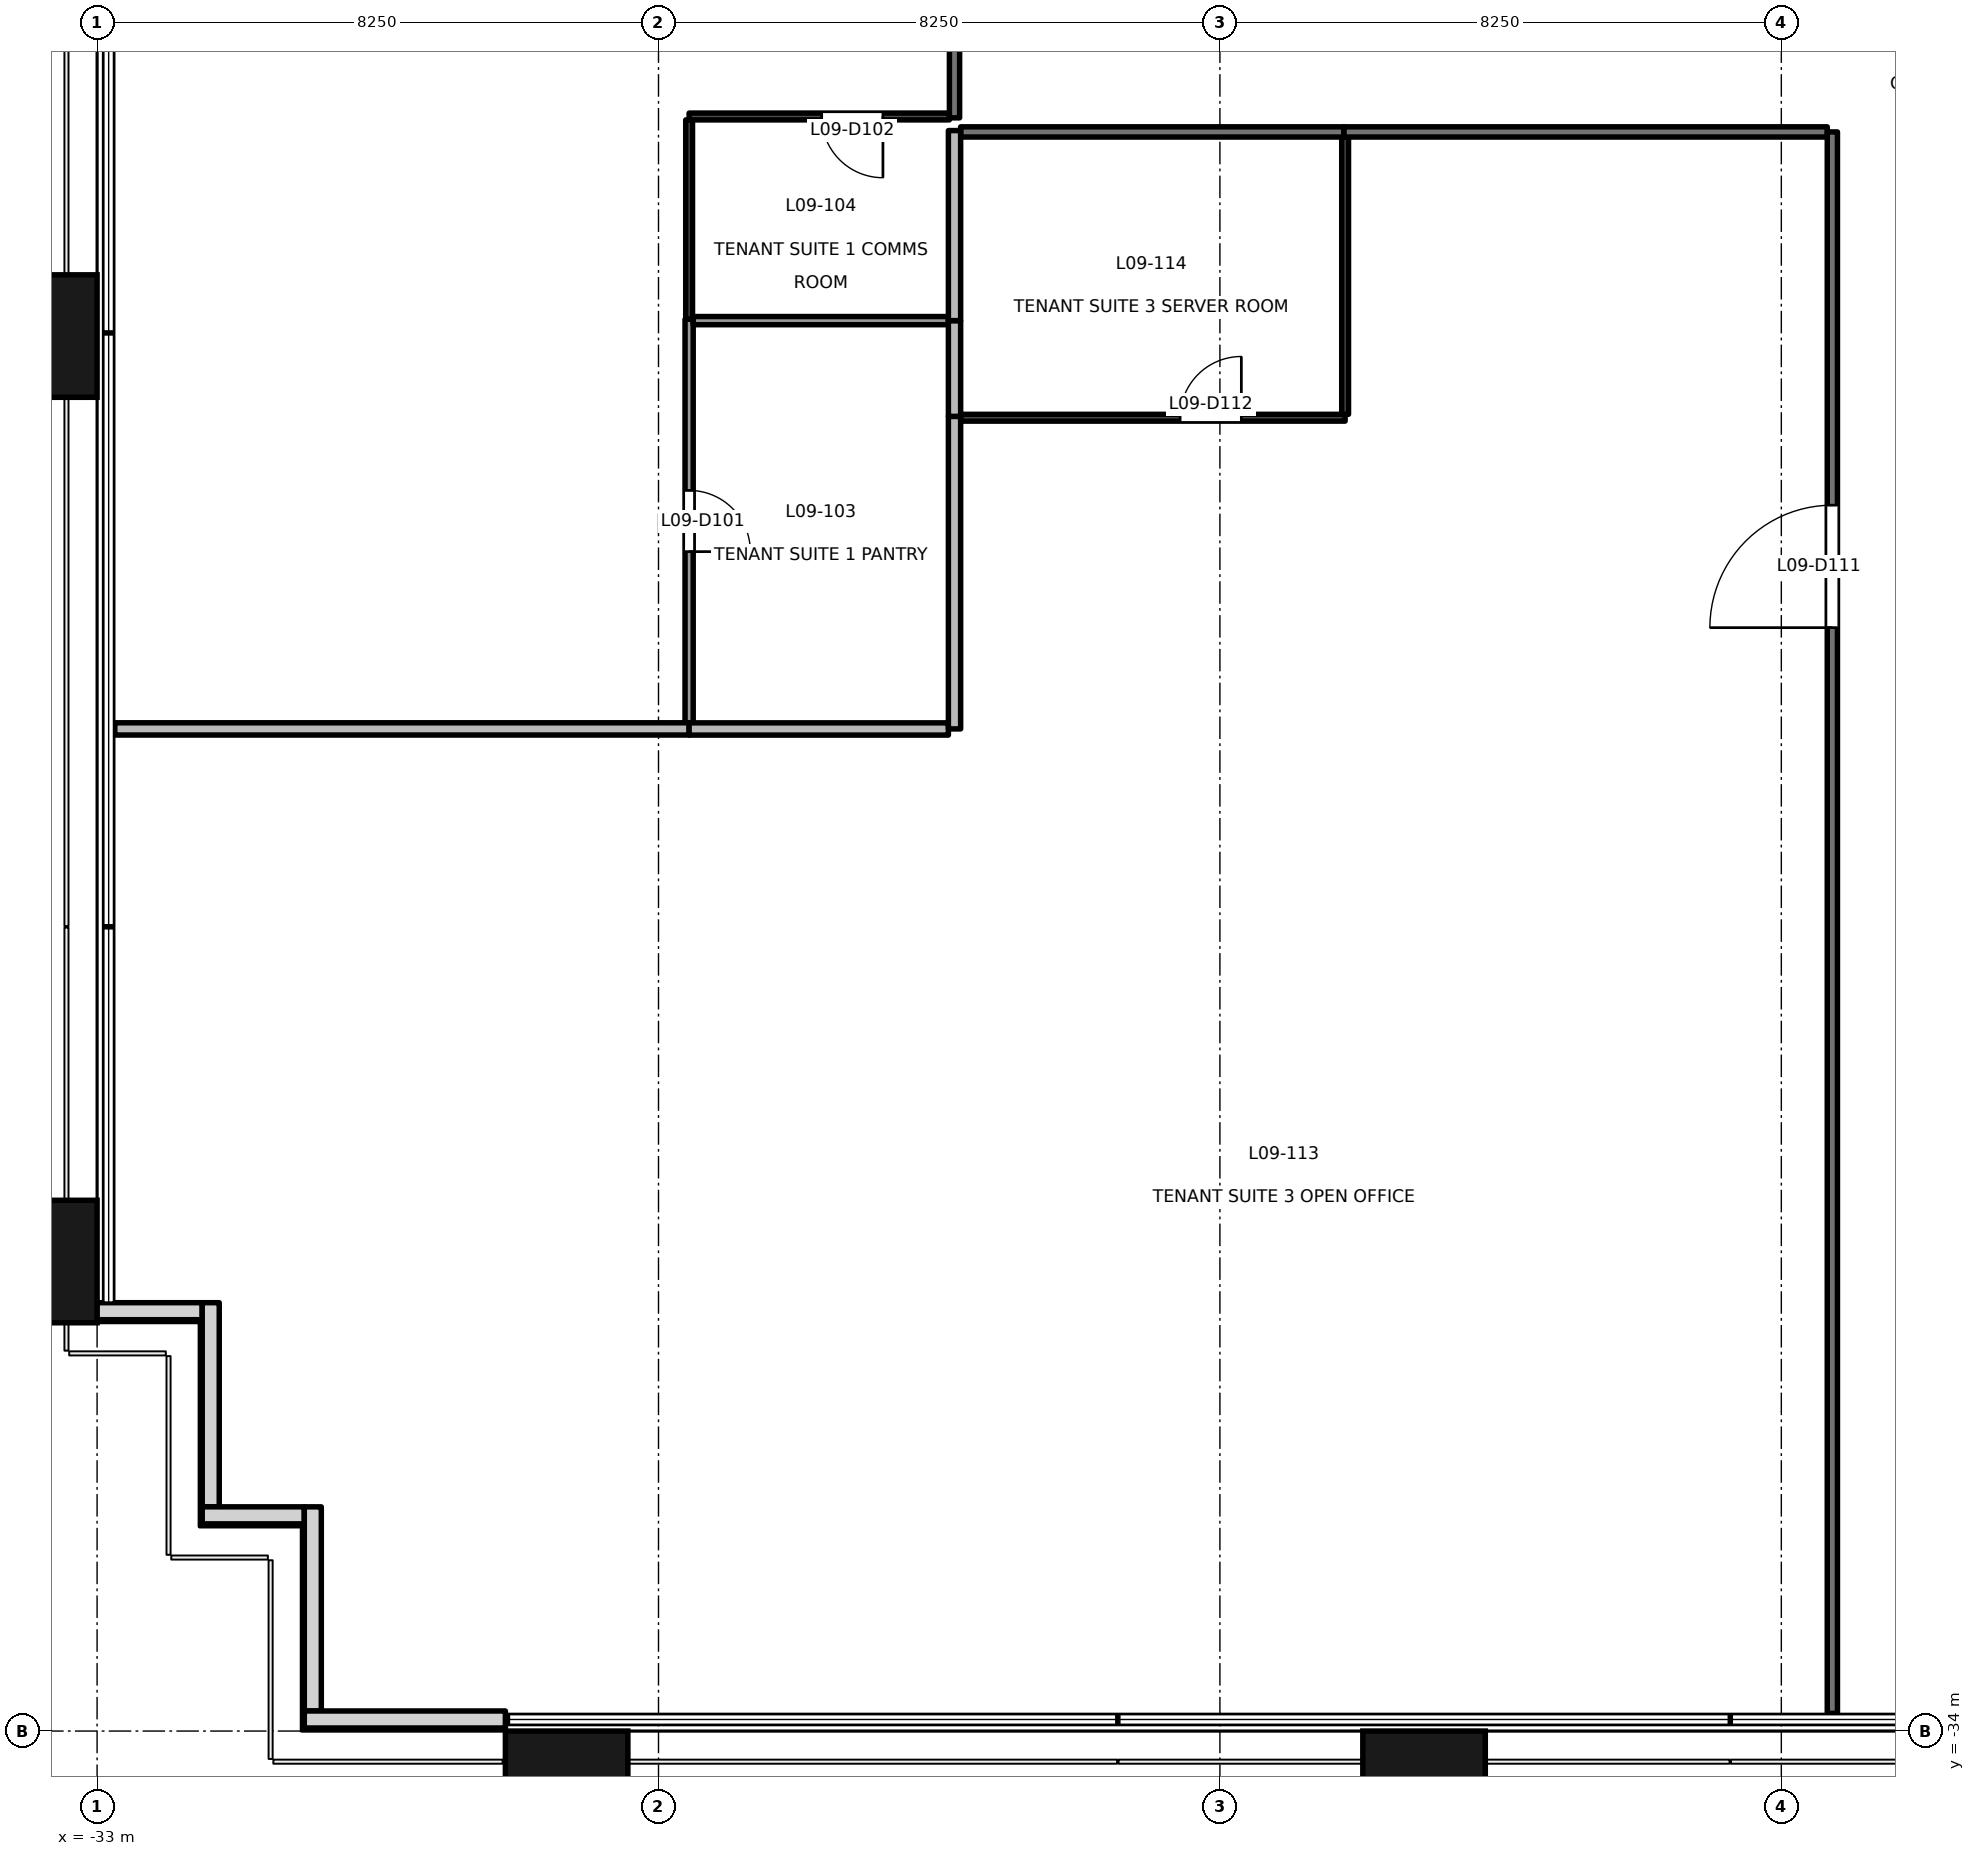
"""IFC4 building model, lengths in metres.
Left out: names, types, materials, properties, quantities, classifications, styles, units other than length and angle.
Written with IfcOpenShell. Run it as: python <this file> out.ifc"""

import sys

from ifc_helpers import new_model, si_unit, direction, frame, frame_2d, origin, origin_2d, place, context, subcontext, project, spatial, rectangle, extrude, element, fill, save


model = new_model("IFC4")
c1 = context("Model", 3, precision=1e-05, world=origin(), true_north=direction((0.0, 1.0)))
c2 = subcontext(c1, "Body", "Model", "MODEL_VIEW")
j1 = project(units=[si_unit("LENGTHUNIT", "METRE"), si_unit("PLANEANGLEUNIT", "RADIAN")], contexts=[c1])
p1 = place(None, origin())
s1 = spatial("IfcSite", under=j1, at=p1, CompositionType="ELEMENT")
p2 = place(p1, origin())
s2 = spatial("IfcBuilding", under=s1, at=p2, CompositionType="ELEMENT")
p3 = place(p2, frame((0.0, 0.0, 44.7)))
s3 = spatial("IfcBuildingStorey", under=s2, at=p3, CompositionType="ELEMENT", Elevation=44.7)
for number, where, z_axis, x_axis in (
    (1, (-26.1, -34.9, -0.2), (0.0, 0.0, 1.0), (1.0, 0.0, 0.0)),
    (2, (-13.5, -34.9, -0.2), (0.0, 0.0, 1.0), (1.0, 0.0, 0.0)),
    (3, (-33.9, -27.1, -0.2), (0.0, 0.0, 1.0), (0.0, 1.0, 0.0)),
    (4, (-33.9, -13.5, -0.2), (0.0, 0.0, 1.0), (0.0, 1.0, 0.0)),
):
    element("IfcColumn", number, at=place(p3, frame(where, z_axis=z_axis, x_axis=x_axis)), inside=s3, PredefinedType="COLUMN", context=c2, shape_type="SweptSolid", body=[
        extrude(rectangle(XDim=1.8, YDim=1.8, at=origin_2d()), origin(), (0.0, 0.0, 1.0), 4.1),
    ])
p4 = place(p3, frame((-33.005, -27.83, 0.0), z_axis=(0.0, 0.0, 1.0), x_axis=(1.0, 0.0, 0.0)))
e5 = element("IfcWall", 5, at=p4, inside=s3, PredefinedType="SOLIDWALL", context=c2, shape_type="SweptSolid", body=[
    extrude(rectangle(XDim=1.55, YDim=0.25, at=frame_2d((0.775, 0.0))), origin(), (0.0, 0.0, 1.0), 3.9),
])
p5 = place(p3, frame((-31.33, -27.705, 0.0), z_axis=(0.0, 0.0, 1.0), x_axis=(0.0, -1.0, 0.0)))
e6 = element("IfcWall", 6, at=p5, inside=s3, PredefinedType="SOLIDWALL", context=c2, shape_type="SweptSolid", body=[
    extrude(rectangle(XDim=3.0, YDim=0.25, at=frame_2d((1.5, 0.0))), origin(), (0.0, 0.0, 1.0), 3.9),
])
p6 = place(p3, frame((-31.455, -30.83, 0.0), z_axis=(0.0, 0.0, 1.0), x_axis=(1.0, 0.0, 0.0)))
e7 = element("IfcWall", 7, at=p6, inside=s3, PredefinedType="SOLIDWALL", context=c2, shape_type="SweptSolid", body=[
    extrude(rectangle(XDim=1.5, YDim=0.25, at=frame_2d((0.75, 0.0))), origin(), (0.0, 0.0, 1.0), 3.9),
])
p7 = place(p3, frame((-29.83, -30.705, 0.0), z_axis=(0.0, 0.0, 1.0), x_axis=(0.0, -1.0, 0.0)))
e8 = element("IfcWall", 8, at=p7, inside=s3, PredefinedType="SOLIDWALL", context=c2, shape_type="SweptSolid", body=[
    extrude(rectangle(XDim=3.0, YDim=0.25, at=frame_2d((1.5, 0.0))), origin(), (0.0, 0.0, 1.0), 3.9),
])
p8 = place(p3, frame((-29.955, -33.83, 0.0), z_axis=(0.0, 0.0, 1.0), x_axis=(1.0, 0.0, 0.0)))
e9 = element("IfcWall", 9, at=p8, inside=s3, PredefinedType="SOLIDWALL", context=c2, shape_type="SweptSolid", body=[
    extrude(rectangle(XDim=2.955, YDim=0.25, at=frame_2d((1.478, 0.0))), origin(), (0.0, 0.0, 1.0), 3.9),
])
p9 = place(p3, frame((-20.4, -10.293, 0.0), z_axis=(0.0, 0.0, 1.0), x_axis=(0.0, 1.0, 0.0)))
e10 = element("IfcWall", 10, at=p9, inside=s3, PredefinedType="PARTITIONING", context=c2, shape_type="SweptSolid", body=[
    extrude(rectangle(XDim=6.04, YDim=0.15, at=frame_2d((3.02, 0.0))), origin(), (0.0, 0.0, 1.0), 3.3),
])
p10 = place(p9, frame((2.12, 0.0, 0.0)))
e11 = element("IfcOpeningElement", 11, at=p10, cuts=e10, PredefinedType="OPENING", context=c2, shape_type="SweptSolid", body=[
    extrude(rectangle(XDim=1.8, YDim=2.1, at=frame_2d((0.9, 1.05))), frame((0.0, 0.085, 0.0), z_axis=(0.0, -1.0, 0.0), x_axis=(1.0, 0.0, 0.0)), (0.0, 0.0, 1.0), 0.171),
])
p11 = place(p3, frame((-7.575, -10.5, 0.0), z_axis=(0.0, 0.0, 1.0), x_axis=(-1.0, 0.0, 0.0)))
e12 = element("IfcWall", 12, at=p11, inside=s3, PredefinedType="PARTITIONING", context=c2, shape_type="SweptSolid", body=[
    extrude(rectangle(XDim=7.105, YDim=0.15, at=frame_2d((3.552, 0.0))), origin(), (0.0, 0.0, 1.0), 2.9),
])
p12 = place(p3, frame((-7.5, -33.74, 0.0), z_axis=(0.0, 0.0, 1.0), x_axis=(0.0, 1.0, 0.0)))
e13 = element("IfcWall", 13, at=p12, inside=s3, PredefinedType="PARTITIONING", context=c2, shape_type="SweptSolid", body=[
    extrude(rectangle(XDim=23.24, YDim=0.15, at=frame_2d((11.62, 0.0))), origin(), (0.0, 0.0, 1.0), 3.9),
])
p13 = place(p12, frame((15.955, 0.0, 0.0)))
e14 = element("IfcOpeningElement", 14, at=p13, cuts=e13, PredefinedType="OPENING", context=c2, shape_type="SweptSolid", body=[
    extrude(rectangle(XDim=1.8, YDim=2.1, at=frame_2d((0.9, 1.05))), frame((0.0, 0.085, 0.0), z_axis=(0.0, -1.0, 0.0), x_axis=(1.0, 0.0, 0.0)), (0.0, 0.0, 1.0), 0.171),
])
p14 = place(p3, frame((-14.68, -10.5, 0.0), z_axis=(0.0, 0.0, 1.0), x_axis=(-1.0, 0.0, 0.0)))
e15 = element("IfcWall", 15, at=p14, inside=s3, PredefinedType="PARTITIONING", context=c2, shape_type="SweptSolid", body=[
    extrude(rectangle(XDim=5.63, YDim=0.15, at=frame_2d((2.815, 0.0))), origin(), (0.0, 0.0, 1.0), 2.5),
])
p15 = place(p3, frame((-24.3, -13.253, 0.0), z_axis=(0.0, 0.0, 1.0), x_axis=(0.0, -1.0, 0.0)))
e16 = element("IfcWall", 16, at=p15, inside=s3, PredefinedType="PARTITIONING", context=c2, shape_type="SweptSolid", body=[
    extrude(rectangle(XDim=5.93, YDim=0.12, at=frame_2d((2.965, 0.0))), origin(), (0.0, 0.0, 1.0), 3.3),
])
p16 = place(p15, frame((2.515, 0.0, 0.0)))
e17 = element("IfcOpeningElement", 17, at=p16, cuts=e16, PredefinedType="OPENING", context=c2, shape_type="SweptSolid", body=[
    extrude(rectangle(XDim=0.9, YDim=2.1, at=frame_2d((0.45, 1.05))), frame((0.0, 0.071, 0.0), z_axis=(0.0, -1.0, 0.0), x_axis=(1.0, 0.0, 0.0)), (0.0, 0.0, 1.0), 0.141),
])
p17 = place(p3, frame((-24.3, -10.323, 0.0), z_axis=(0.0, 0.0, 1.0), x_axis=(0.0, -1.0, 0.0)))
e18 = element("IfcWall", 18, at=p17, inside=s3, PredefinedType="PARTITIONING", context=c2, shape_type="SweptSolid", body=[
    extrude(rectangle(XDim=2.93, YDim=0.1, at=frame_2d((1.465, 0.0))), origin(), (0.0, 0.0, 1.0), 3.9),
])
p18 = place(p3, frame((-20.475, -10.273, 0.0), z_axis=(0.0, 0.0, 1.0), x_axis=(-1.0, 0.0, 0.0)))
e19 = element("IfcWall", 19, at=p18, inside=s3, PredefinedType="PARTITIONING", context=c2, shape_type="SweptSolid", body=[
    extrude(rectangle(XDim=3.825, YDim=0.1, at=frame_2d((1.913, 0.0))), origin(), (0.0, 0.0, 1.0), 3.9),
])
p19 = place(p18, frame((0.977, 0.0, 0.0)))
e20 = element("IfcOpeningElement", 20, at=p19, cuts=e19, PredefinedType="OPENING", context=c2, shape_type="SweptSolid", body=[
    extrude(rectangle(XDim=0.9, YDim=2.1, at=frame_2d((0.45, 1.05))), frame((0.0, 0.061, 0.0), z_axis=(0.0, -1.0, 0.0), x_axis=(1.0, 0.0, 0.0)), (0.0, 0.0, 1.0), 0.121),
])
p20 = place(p3, frame((-24.3, -19.273, 0.0), z_axis=(0.0, 0.0, 1.0), x_axis=(-1.0, 0.0, 0.0)))
e21 = element("IfcWall", 21, at=p20, inside=s3, PredefinedType="PARTITIONING", context=c2, shape_type="SweptSolid", body=[
    extrude(rectangle(XDim=8.44, YDim=0.18, at=frame_2d((4.22, 0.0))), origin(), (0.0, 0.0, 1.0), 3.9),
])
p21 = place(p3, frame((-24.24, -13.273, 0.0), z_axis=(0.0, 0.0, 1.0), x_axis=(1.0, 0.0, 0.0)))
e22 = element("IfcWall", 22, at=p21, inside=s3, PredefinedType="PARTITIONING", context=c2, shape_type="SweptSolid", body=[
    extrude(rectangle(XDim=3.75, YDim=0.12, at=frame_2d((1.875, 0.0))), origin(), (0.0, 0.0, 1.0), 3.9),
])
p22 = place(p3, frame((-20.49, -19.274, 0.0), z_axis=(0.0, 0.0, 1.0), x_axis=(-1.0, 0.0, 0.0)))
e23 = element("IfcWall", 23, at=p22, inside=s3, PredefinedType="PARTITIONING", context=c2, shape_type="SweptSolid", body=[
    extrude(rectangle(XDim=3.81, YDim=0.18, at=frame_2d((1.905, 0.0))), origin(), (0.0, 0.0, 1.0), 3.9),
])
p23 = place(p3, frame((-20.4, -14.68, 0.0), z_axis=(0.0, 0.0, 1.0), x_axis=(0.0, -1.0, 0.0)))
e24 = element("IfcWall", 24, at=p23, inside=s3, PredefinedType="PARTITIONING", context=c2, shape_type="SweptSolid", body=[
    extrude(rectangle(XDim=4.593, YDim=0.18, at=frame_2d((2.296, 0.0))), origin(), (0.0, 0.0, 1.0), 3.3),
])
p24 = place(p3, frame((-20.4, -13.273, 0.0), z_axis=(0.0, 0.0, 1.0), x_axis=(0.0, -1.0, 0.0)))
e25 = element("IfcWall", 25, at=p24, inside=s3, PredefinedType="PARTITIONING", context=c2, shape_type="SweptSolid", body=[
    extrude(rectangle(XDim=1.407, YDim=0.18, at=frame_2d((0.704, 0.0))), origin(), (0.0, 0.0, 1.0), 3.3),
])
p25 = place(p3, frame((-20.4, -10.48, 0.0), z_axis=(0.0, 0.0, 1.0), x_axis=(0.0, -1.0, 0.0)))
e26 = element("IfcWall", 26, at=p25, inside=s3, PredefinedType="PARTITIONING", context=c2, shape_type="SweptSolid", body=[
    extrude(rectangle(XDim=2.793, YDim=0.18, at=frame_2d((1.396, 0.0))), origin(), (0.0, 0.0, 1.0), 3.9),
])
p26 = place(p3, frame((-20.31, -14.7, 0.0), z_axis=(0.0, 0.0, 1.0), x_axis=(1.0, 0.0, 0.0)))
e27 = element("IfcWall", 27, at=p26, inside=s3, PredefinedType="PARTITIONING", context=c2, shape_type="SweptSolid", body=[
    extrude(rectangle(XDim=5.65, YDim=0.1, at=frame_2d((2.825, 0.0))), origin(), (0.0, 0.0, 1.0), 2.5),
])
p27 = place(p26, frame((3.225, 0.0, 0.0)))
e28 = element("IfcOpeningElement", 28, at=p27, cuts=e27, PredefinedType="OPENING", context=c2, shape_type="SweptSolid", body=[
    extrude(rectangle(XDim=0.9, YDim=2.1, at=frame_2d((0.45, 1.05))), frame((0.0, 0.061, 0.0), z_axis=(0.0, -1.0, 0.0), x_axis=(1.0, 0.0, 0.0)), (0.0, 0.0, 1.0), 0.121),
])
p28 = place(p3, frame((-14.66, -14.65, 0.0), z_axis=(0.0, 0.0, 1.0), x_axis=(0.0, 1.0, 0.0)))
e29 = element("IfcWall", 29, at=p28, inside=s3, PredefinedType="PARTITIONING", context=c2, shape_type="SweptSolid", body=[
    extrude(rectangle(XDim=4.075, YDim=0.1, at=frame_2d((2.038, 0.0))), origin(), (0.0, 0.0, 1.0), 3.9),
])
p29 = place(p16, origin())
e30 = element("IfcDoor", 30, at=p29, inside=s3, OperationType="SINGLE_SWING_RIGHT", PredefinedType="DOOR", context=c2, shape_type="SweptSolid", body=[
    extrude(rectangle(XDim=0.9, YDim=2.1, at=frame_2d((0.45, 1.05))), frame((0.0, 0.025, 0.0), z_axis=(0.0, -1.0, 0.0), x_axis=(1.0, 0.0, 0.0)), (0.0, 0.0, 1.0), 0.05),
])
fill(e17, e30)
p30 = place(p19, origin())
e31 = element("IfcDoor", 31, at=p30, inside=s3, OperationType="SINGLE_SWING_LEFT", PredefinedType="DOOR", context=c2, shape_type="SweptSolid", body=[
    extrude(rectangle(XDim=0.9, YDim=2.1, at=frame_2d((0.45, 1.05))), frame((0.0, 0.025, 0.0), z_axis=(0.0, -1.0, 0.0), x_axis=(1.0, 0.0, 0.0)), (0.0, 0.0, 1.0), 0.05),
])
fill(e20, e31)
p31 = place(p13, origin())
e32 = element("IfcDoor", 32, at=p31, inside=s3, OperationType="DOUBLE_DOOR_SINGLE_SWING", PredefinedType="DOOR", context=c2, shape_type="SweptSolid", body=[
    extrude(rectangle(XDim=1.8, YDim=2.1, at=frame_2d((0.9, 1.05))), frame((0.0, 0.025, 0.0), z_axis=(0.0, -1.0, 0.0), x_axis=(1.0, 0.0, 0.0)), (0.0, 0.0, 1.0), 0.05),
])
fill(e14, e32)
p32 = place(p27, origin())
e33 = element("IfcDoor", 33, at=p32, inside=s3, OperationType="SINGLE_SWING_RIGHT", PredefinedType="DOOR", context=c2, shape_type="SweptSolid", body=[
    extrude(rectangle(XDim=0.9, YDim=2.1, at=frame_2d((0.45, 1.05))), frame((0.0, 0.025, 0.0), z_axis=(0.0, -1.0, 0.0), x_axis=(1.0, 0.0, 0.0)), (0.0, 0.0, 1.0), 0.05),
])
fill(e28, e33)
save(model, sys.argv[1])
